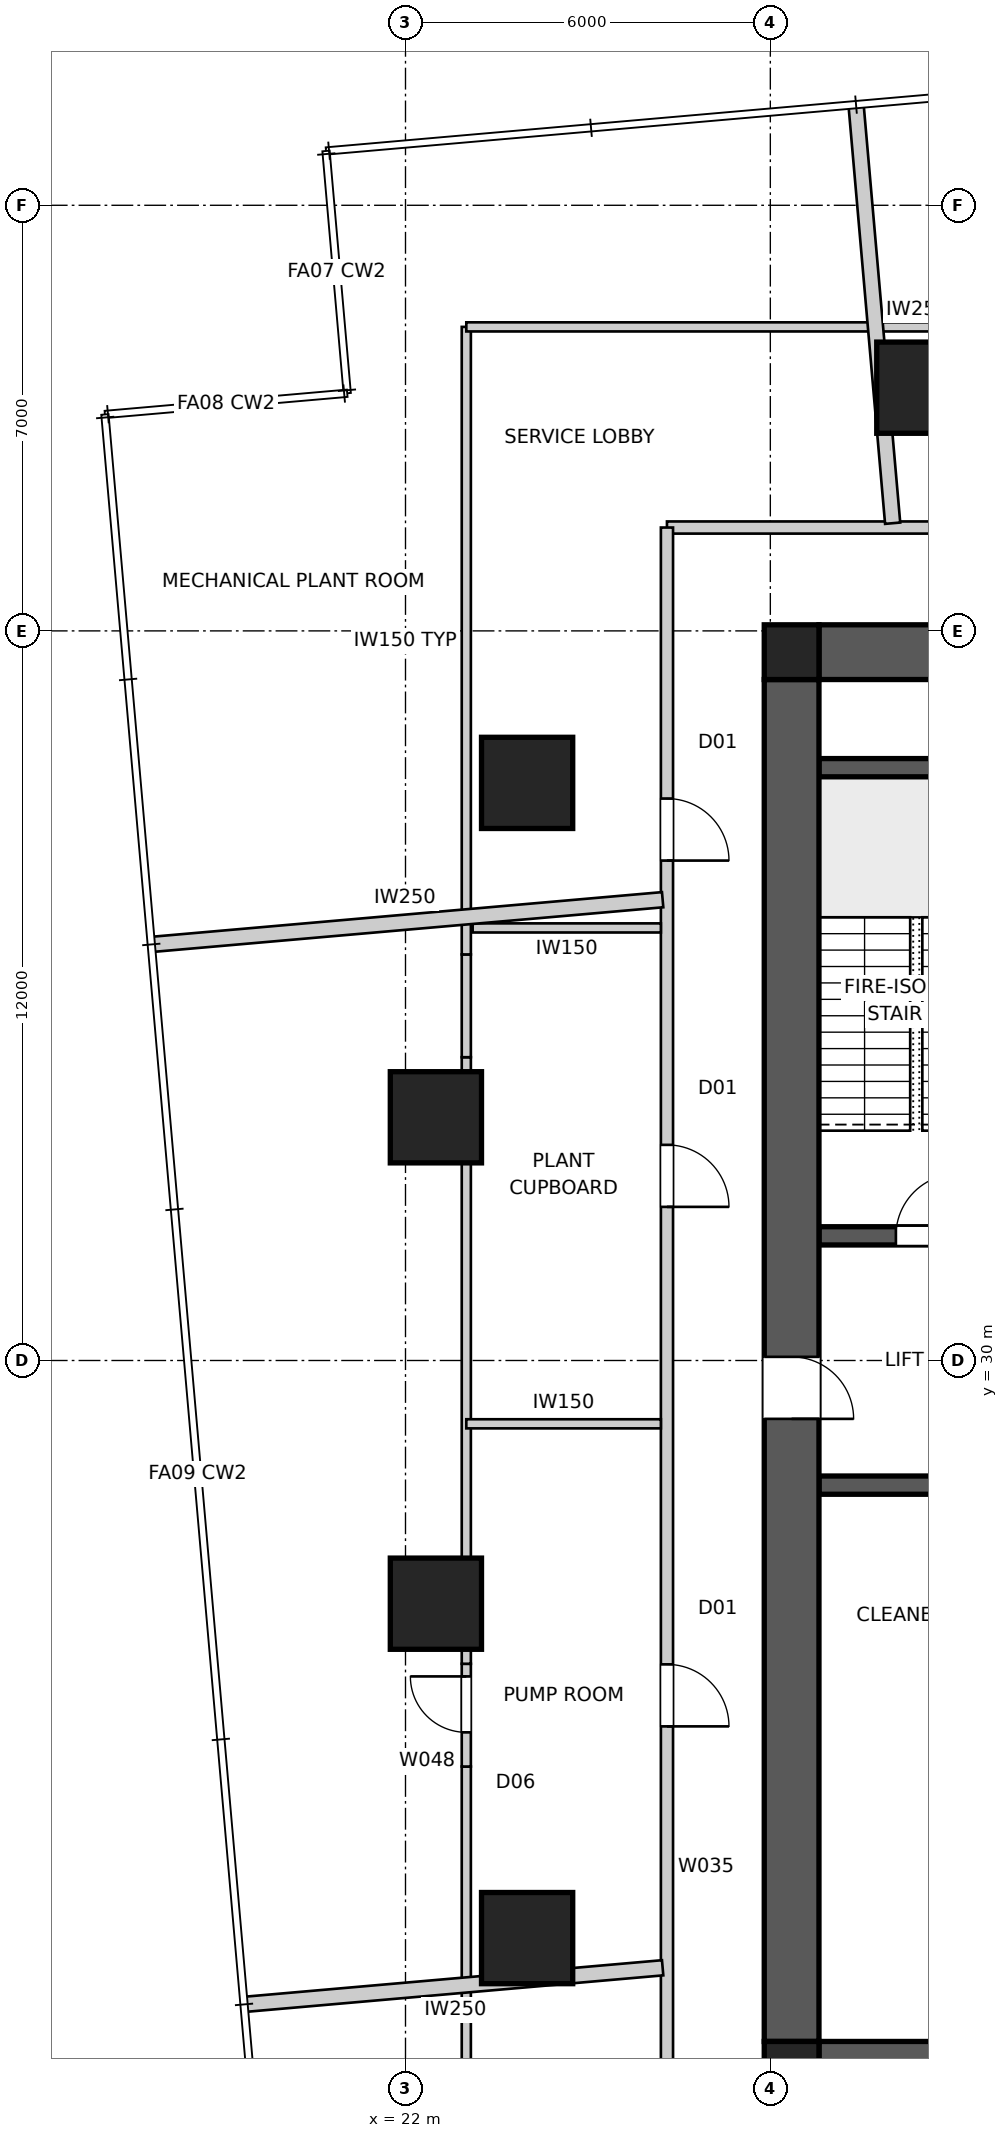
"""IFC4 building model, lengths in metres.
Left out: names, types, materials, properties, quantities, classifications, styles, units other than length and angle.
Written with IfcOpenShell. Run it as: python <this file> out.ifc"""

import sys

from ifc_helpers import new_model, si_unit, direction, frame, frame_2d, origin, origin_2d, place, context, subcontext, project, spatial, polyline, rectangle, outline, extrude, element, fill, save


model = new_model("IFC4")
c1 = context("Model", 3, precision=1e-05, world=origin(), true_north=direction((0.0, 1.0)))
c2 = subcontext(c1, "Body", "Model", "MODEL_VIEW")
j1 = project(units=[si_unit("LENGTHUNIT", "METRE"), si_unit("PLANEANGLEUNIT", "RADIAN")], contexts=[c1])
p1 = place(None, origin())
s1 = spatial("IfcSite", under=j1, at=p1, CompositionType="ELEMENT")
p2 = place(p1, origin())
s2 = spatial("IfcBuilding", under=s1, at=p2, CompositionType="ELEMENT")
p3 = place(p2, frame((0.0, 0.0, 42.2)))
s3 = spatial("IfcBuildingStorey", under=s2, at=p3, CompositionType="ELEMENT", Elevation=42.2)
for number, where, z_axis, x_axis in (
    (1, (28.8, 41.65, 0.0), (0.0, 0.0, 1.0), (1.0, 0.0, 0.0)),
    (2, (51.2, 18.35, 0.0), (0.0, 0.0, 1.0), (-1.0, 0.0, 0.0)),
):
    element("IfcWall", number, at=place(p3, frame(where, z_axis=z_axis, x_axis=x_axis)), inside=s3, PredefinedType="SHEAR", context=c2, shape_type="SweptSolid", body=[
        extrude(outline(polyline([(0.0, -0.45), (22.4, -0.45), (22.4, -0.025), (22.85, -0.025), (22.85, 0.025), (22.4, 0.025), (22.4, 0.45), (0.0, 0.45), (0.0, 0.025), (-0.45, 0.025), (-0.45, -0.025), (0.0, -0.025), (0.0, -0.45)])), origin(), (0.0, 0.0, 1.0), 5.0),
    ])
p4 = place(p3, frame((28.35, 41.2, 0.0), z_axis=(0.0, 0.0, 1.0), x_axis=(0.0, -1.0, 0.0)))
e3 = element("IfcWall", 3, at=p4, inside=s3, PredefinedType="SHEAR", context=c2, shape_type="SweptSolid", body=[
    extrude(outline(polyline([(0.0, -0.45), (22.4, -0.45), (22.4, -0.025), (22.85, -0.025), (22.85, 0.025), (22.4, 0.025), (22.4, 0.45), (0.0, 0.45), (0.0, 0.025), (-0.45, 0.025), (-0.45, -0.025), (0.0, -0.025), (0.0, -0.45)])), origin(), (0.0, 0.0, 1.0), 5.0),
])
p5 = place(p4, frame((11.14, 0.0, 0.0)))
e4 = element("IfcOpeningElement", 4, at=p5, cuts=e3, PredefinedType="OPENING", context=c2, shape_type="SweptSolid", body=[
    extrude(rectangle(XDim=1.02, YDim=2.4, at=frame_2d((0.51, 1.2))), frame((0.0, 0.46, 0.0), z_axis=(0.0, -1.0, 0.0), x_axis=(1.0, 0.0, 0.0)), (0.0, 0.0, 1.0), 0.92),
])
p6 = place(p3, frame((28.8, 32.05, 0.0), z_axis=(0.0, 0.0, 1.0), x_axis=(1.0, 0.0, 0.0)))
e5 = element("IfcWall", 5, at=p6, inside=s3, PredefinedType="SHEAR", context=c2, shape_type="SweptSolid", body=[
    extrude(rectangle(XDim=22.4, YDim=0.3, at=frame_2d((11.2, 0.0))), origin(), (0.0, 0.0, 1.0), 5.0),
])
p7 = place(p6, frame((19.04, 0.0, 0.0)))
e6 = element("IfcOpeningElement", 6, at=p7, cuts=e5, PredefinedType="OPENING", context=c2, shape_type="SweptSolid", body=[
    extrude(rectangle(XDim=0.92, YDim=2.1, at=frame_2d((0.46, 1.05))), frame((0.0, 0.16, 0.0), z_axis=(0.0, -1.0, 0.0), x_axis=(1.0, 0.0, 0.0)), (0.0, 0.0, 1.0), 0.32),
])
p8 = place(p6, frame((1.265, 0.0, 0.0)))
e7 = element("IfcOpeningElement", 7, at=p8, cuts=e5, PredefinedType="OPENING", context=c2, shape_type="SweptSolid", body=[
    extrude(rectangle(XDim=1.02, YDim=2.1, at=frame_2d((0.51, 1.05))), frame((0.0, 0.16, 0.0), z_axis=(0.0, -1.0, 0.0), x_axis=(1.0, 0.0, 0.0)), (0.0, 0.0, 1.0), 0.32),
])
p9 = place(p6, frame((4.015, 0.0, 0.0)))
e8 = element("IfcOpeningElement", 8, at=p9, cuts=e5, PredefinedType="OPENING", context=c2, shape_type="SweptSolid", body=[
    extrude(rectangle(XDim=0.92, YDim=2.1, at=frame_2d((0.46, 1.05))), frame((0.0, 0.16, 0.0), z_axis=(0.0, -1.0, 0.0), x_axis=(1.0, 0.0, 0.0)), (0.0, 0.0, 1.0), 0.32),
])
p10 = place(p6, frame((6.45, 0.0, 0.0)))
e9 = element("IfcOpeningElement", 9, at=p10, cuts=e5, PredefinedType="OPENING", context=c2, shape_type="SweptSolid", body=[
    extrude(rectangle(XDim=1.1, YDim=2.1, at=frame_2d((0.55, 1.05))), frame((0.0, 0.16, 0.0), z_axis=(0.0, -1.0, 0.0), x_axis=(1.0, 0.0, 0.0)), (0.0, 0.0, 1.0), 0.32),
])
p11 = place(p6, frame((9.25, 0.0, 0.0)))
e10 = element("IfcOpeningElement", 10, at=p11, cuts=e5, PredefinedType="OPENING", context=c2, shape_type="SweptSolid", body=[
    extrude(rectangle(XDim=1.1, YDim=2.1, at=frame_2d((0.55, 1.05))), frame((0.0, 0.16, 0.0), z_axis=(0.0, -1.0, 0.0), x_axis=(1.0, 0.0, 0.0)), (0.0, 0.0, 1.0), 0.32),
])
p12 = place(p6, frame((14.85, 0.0, 0.0)))
e11 = element("IfcOpeningElement", 11, at=p12, cuts=e5, PredefinedType="OPENING", context=c2, shape_type="SweptSolid", body=[
    extrude(rectangle(XDim=1.1, YDim=2.1, at=frame_2d((0.55, 1.05))), frame((0.0, 0.16, 0.0), z_axis=(0.0, -1.0, 0.0), x_axis=(1.0, 0.0, 0.0)), (0.0, 0.0, 1.0), 0.32),
])
p13 = place(p3, frame((51.2, 27.95, 0.0), z_axis=(0.0, 0.0, 1.0), x_axis=(-1.0, 0.0, 0.0)))
e12 = element("IfcWall", 12, at=p13, inside=s3, PredefinedType="SHEAR", context=c2, shape_type="SweptSolid", body=[
    extrude(rectangle(XDim=22.4, YDim=0.3, at=frame_2d((11.2, 0.0))), origin(), (0.0, 0.0, 1.0), 5.0),
])
p14 = place(p13, frame((19.04, 0.0, 0.0)))
e13 = element("IfcOpeningElement", 13, at=p14, cuts=e12, PredefinedType="OPENING", context=c2, shape_type="SweptSolid", body=[
    extrude(rectangle(XDim=0.92, YDim=2.1, at=frame_2d((0.46, 1.05))), frame((0.0, 0.16, 0.0), z_axis=(0.0, -1.0, 0.0), x_axis=(1.0, 0.0, 0.0)), (0.0, 0.0, 1.0), 0.32),
])
p15 = place(p13, frame((1.265, 0.0, 0.0)))
e14 = element("IfcOpeningElement", 14, at=p15, cuts=e12, PredefinedType="OPENING", context=c2, shape_type="SweptSolid", body=[
    extrude(rectangle(XDim=1.02, YDim=2.1, at=frame_2d((0.51, 1.05))), frame((0.0, 0.16, 0.0), z_axis=(0.0, -1.0, 0.0), x_axis=(1.0, 0.0, 0.0)), (0.0, 0.0, 1.0), 0.32),
])
p16 = place(p13, frame((4.015, 0.0, 0.0)))
e15 = element("IfcOpeningElement", 15, at=p16, cuts=e12, PredefinedType="OPENING", context=c2, shape_type="SweptSolid", body=[
    extrude(rectangle(XDim=0.92, YDim=2.1, at=frame_2d((0.46, 1.05))), frame((0.0, 0.16, 0.0), z_axis=(0.0, -1.0, 0.0), x_axis=(1.0, 0.0, 0.0)), (0.0, 0.0, 1.0), 0.32),
])
p17 = place(p13, frame((14.85, 0.0, 0.0)))
e16 = element("IfcOpeningElement", 16, at=p17, cuts=e12, PredefinedType="OPENING", context=c2, shape_type="SweptSolid", body=[
    extrude(rectangle(XDim=1.1, YDim=2.1, at=frame_2d((0.55, 1.05))), frame((0.0, 0.16, 0.0), z_axis=(0.0, -1.0, 0.0), x_axis=(1.0, 0.0, 0.0)), (0.0, 0.0, 1.0), 0.32),
])
p18 = place(p3, frame((28.8, 39.75, 0.0), z_axis=(0.0, 0.0, 1.0), x_axis=(1.0, 0.0, 0.0)))
e17 = element("IfcWall", 17, at=p18, inside=s3, PredefinedType="SHEAR", context=c2, shape_type="SweptSolid", body=[
    extrude(rectangle(XDim=3.5, YDim=0.3, at=frame_2d((1.75, 0.0))), origin(), (0.0, 0.0, 1.0), 5.0),
])
for number, where, z_axis, x_axis in (
    (18, (28.35, 18.35, 0.0), (0.0, 0.0, 1.0), (1.0, 0.0, 0.0)),
    (19, (28.35, 41.65, 0.0), (0.0, 0.0, 1.0), (1.0, 0.0, 0.0)),
):
    element("IfcColumn", number, at=place(p3, frame(where, z_axis=z_axis, x_axis=x_axis)), inside=s3, PredefinedType="COLUMN", context=c2, shape_type="SweptSolid", body=[
        extrude(rectangle(XDim=0.9, YDim=0.9, at=origin_2d()), origin(), (0.0, 0.0, 1.0), 5.0),
    ])
for number, where, z_axis, x_axis in (
    (20, (30.5, 46.0, 0.0), (0.0, 0.0, 1.0), (1.0, 0.0, 0.0)),
    (21, (24.0, 39.5, 0.0), (0.0, 0.0, 1.0), (1.0, 0.0, 0.0)),
    (22, (22.5, 34.0, 0.0), (0.0, 0.0, 1.0), (1.0, 0.0, 0.0)),
    (23, (22.5, 26.0, 0.0), (0.0, 0.0, 1.0), (1.0, 0.0, 0.0)),
    (24, (24.0, 20.5, 0.0), (0.0, 0.0, 1.0), (1.0, 0.0, 0.0)),
):
    element("IfcColumn", number, at=place(p3, frame(where, z_axis=z_axis, x_axis=x_axis)), inside=s3, PredefinedType="COLUMN", context=c2, shape_type="SweptSolid", body=[
        extrude(rectangle(XDim=1.5, YDim=1.5, at=origin_2d()), origin(), (0.0, 0.0, 1.0), 5.0),
    ])
p19 = place(p3, frame((53.7, 43.7, 0.0), z_axis=(0.0, 0.0, 1.0), x_axis=(-1.0, 0.0, 0.0)))
e25 = element("IfcWall", 25, at=p19, inside=s3, PredefinedType="PARTITIONING", context=c2, shape_type="SweptSolid", body=[
    extrude(rectangle(XDim=27.4, YDim=0.2, at=frame_2d((13.7, 0.0))), origin(), (0.0, 0.0, 1.0), 4.85),
])
p20 = place(p19, frame((18.698, 0.0, 0.0)))
e26 = element("IfcOpeningElement", 26, at=p20, cuts=e25, PredefinedType="OPENING", context=c2, shape_type="SweptSolid", body=[
    extrude(rectangle(XDim=1.02, YDim=2.34, at=frame_2d((0.51, 1.17))), frame((0.0, 0.11, 0.0), z_axis=(0.0, -1.0, 0.0), x_axis=(1.0, 0.0, 0.0)), (0.0, 0.0, 1.0), 0.22),
])
p21 = place(p19, frame((10.153, 0.0, 0.0)))
e27 = element("IfcOpeningElement", 27, at=p21, cuts=e25, PredefinedType="OPENING", context=c2, shape_type="SweptSolid", body=[
    extrude(rectangle(XDim=1.02, YDim=2.34, at=frame_2d((0.51, 1.17))), frame((0.0, 0.11, 0.0), z_axis=(0.0, -1.0, 0.0), x_axis=(1.0, 0.0, 0.0)), (0.0, 0.0, 1.0), 0.22),
])
p22 = place(p19, frame((4.458, 0.0, 0.0)))
e28 = element("IfcOpeningElement", 28, at=p22, cuts=e25, PredefinedType="OPENING", context=c2, shape_type="SweptSolid", body=[
    extrude(rectangle(XDim=1.02, YDim=2.34, at=frame_2d((0.51, 1.17))), frame((0.0, 0.11, 0.0), z_axis=(0.0, -1.0, 0.0), x_axis=(1.0, 0.0, 0.0)), (0.0, 0.0, 1.0), 0.22),
])
p23 = place(p3, frame((26.3, 43.7, 0.0), z_axis=(0.0, 0.0, 1.0), x_axis=(0.0, -1.0, 0.0)))
e29 = element("IfcWall", 29, at=p23, inside=s3, PredefinedType="PARTITIONING", context=c2, shape_type="SweptSolid", body=[
    extrude(rectangle(XDim=27.4, YDim=0.2, at=frame_2d((13.7, 0.0))), origin(), (0.0, 0.0, 1.0), 4.85),
])
p24 = place(p23, frame((18.698, 0.0, 0.0)))
e30 = element("IfcOpeningElement", 30, at=p24, cuts=e29, PredefinedType="OPENING", context=c2, shape_type="SweptSolid", body=[
    extrude(rectangle(XDim=1.02, YDim=2.34, at=frame_2d((0.51, 1.17))), frame((0.0, 0.11, 0.0), z_axis=(0.0, -1.0, 0.0), x_axis=(1.0, 0.0, 0.0)), (0.0, 0.0, 1.0), 0.22),
])
p25 = place(p23, frame((10.153, 0.0, 0.0)))
e31 = element("IfcOpeningElement", 31, at=p25, cuts=e29, PredefinedType="OPENING", context=c2, shape_type="SweptSolid", body=[
    extrude(rectangle(XDim=1.02, YDim=2.34, at=frame_2d((0.51, 1.17))), frame((0.0, 0.11, 0.0), z_axis=(0.0, -1.0, 0.0), x_axis=(1.0, 0.0, 0.0)), (0.0, 0.0, 1.0), 0.22),
])
p26 = place(p23, frame((4.458, 0.0, 0.0)))
e32 = element("IfcOpeningElement", 32, at=p26, cuts=e29, PredefinedType="OPENING", context=c2, shape_type="SweptSolid", body=[
    extrude(rectangle(XDim=1.02, YDim=2.34, at=frame_2d((0.51, 1.17))), frame((0.0, 0.11, 0.0), z_axis=(0.0, -1.0, 0.0), x_axis=(1.0, 0.0, 0.0)), (0.0, 0.0, 1.0), 0.22),
])
p27 = place(p3, frame((29.409, 50.656, 0.0), z_axis=(0.0, 0.0, 1.0), x_axis=(0.087152488477, -0.996194982798, 0.0)))
e33 = element("IfcWall", 33, at=p27, inside=s3, PredefinedType="PARTITIONING", context=c2, shape_type="SweptSolid", body=[
    extrude(rectangle(XDim=6.911, YDim=0.25, at=frame_2d((3.456, 0.0))), origin(), (0.0, 0.0, 1.0), 4.85),
])
p28 = place(p3, frame((17.819, 36.843, 0.0), z_axis=(0.0, 0.0, 1.0), x_axis=(0.996194000005, 0.087163721544, 0.0)))
e34 = element("IfcWall", 34, at=p28, inside=s3, PredefinedType="PARTITIONING", context=c2, shape_type="SweptSolid", body=[
    extrude(rectangle(XDim=8.442, YDim=0.25, at=frame_2d((4.221, 0.0))), origin(), (0.0, 0.0, 1.0), 4.85),
])
p29 = place(p3, frame((19.344, 19.409, 0.0), z_axis=(0.0, 0.0, 1.0), x_axis=(0.996194982798, 0.087152488477, 0.0)))
e35 = element("IfcWall", 35, at=p29, inside=s3, PredefinedType="PARTITIONING", context=c2, shape_type="SweptSolid", body=[
    extrude(rectangle(XDim=6.911, YDim=0.25, at=frame_2d((3.456, 0.0))), origin(), (0.0, 0.0, 1.0), 4.85),
])
p30 = place(p3, frame((23.0, 13.0, 0.0), z_axis=(0.0, 0.0, 1.0), x_axis=(0.0, 1.0, 0.0)))
e36 = element("IfcWall", 36, at=p30, inside=s3, PredefinedType="SOLIDWALL", context=c2, shape_type="SweptSolid", body=[
    extrude(rectangle(XDim=10.322, YDim=0.15, at=frame_2d((5.161, 0.0))), origin(), (0.0, 0.0, 1.0), 4.85),
])
p31 = place(p3, frame((23.0, 23.322, 0.0), z_axis=(0.0, 0.0, 1.0), x_axis=(0.0, 1.0, 0.0)))
e37 = element("IfcWall", 37, at=p31, inside=s3, PredefinedType="SOLIDWALL", context=c2, shape_type="SweptSolid", body=[
    extrude(rectangle(XDim=1.69, YDim=0.15, at=frame_2d((0.845, 0.0))), origin(), (0.0, 0.0, 1.0), 3.85),
])
p32 = place(p31, frame((0.562, 0.0, 0.0)))
e38 = element("IfcOpeningElement", 38, at=p32, cuts=e37, PredefinedType="OPENING", context=c2, shape_type="SweptSolid", body=[
    extrude(rectangle(XDim=0.92, YDim=2.1, at=frame_2d((0.46, 1.05))), frame((0.0, 0.085, 0.0), z_axis=(0.0, -1.0, 0.0), x_axis=(1.0, 0.0, 0.0)), (0.0, 0.0, 1.0), 0.17),
])
p33 = place(p3, frame((23.0, 25.012, 0.0), z_axis=(0.0, 0.0, 1.0), x_axis=(0.0, 1.0, 0.0)))
e39 = element("IfcWall", 39, at=p33, inside=s3, PredefinedType="SOLIDWALL", context=c2, shape_type="SweptSolid", body=[
    extrude(rectangle(XDim=9.977, YDim=0.15, at=frame_2d((4.988, 0.0))), origin(), (0.0, 0.0, 1.0), 4.85),
])
p34 = place(p3, frame((23.0, 34.988, 0.0), z_axis=(0.0, 0.0, 1.0), x_axis=(0.0, 1.0, 0.0)))
e40 = element("IfcWall", 40, at=p34, inside=s3, PredefinedType="SOLIDWALL", context=c2, shape_type="SweptSolid", body=[
    extrude(rectangle(XDim=1.69, YDim=0.15, at=frame_2d((0.845, 0.0))), origin(), (0.0, 0.0, 1.0), 3.85),
])
for number, where, z_axis, x_axis in (
    (41, (23.0, 36.678, 0.0), (0.0, 0.0, 1.0), (0.0, 1.0, 0.0)),
    (42, (23.0, 47.0, 0.0), (0.0, 0.0, 1.0), (1.0, 0.0, 0.0)),
):
    element("IfcWall", number, at=place(p3, frame(where, z_axis=z_axis, x_axis=x_axis)), inside=s3, PredefinedType="SOLIDWALL", context=c2, shape_type="SweptSolid", body=[
        extrude(rectangle(XDim=10.322, YDim=0.15, at=frame_2d((5.161, 0.0))), origin(), (0.0, 0.0, 1.0), 4.85),
    ])
p35 = place(p3, frame((26.2, 37.115, 0.0), z_axis=(0.0, 0.0, 1.0), x_axis=(-1.0, 0.0, 0.0)))
e43 = element("IfcWall", 43, at=p35, inside=s3, PredefinedType="SOLIDWALL", context=c2, shape_type="SweptSolid", body=[
    extrude(rectangle(XDim=3.096, YDim=0.15, at=frame_2d((1.548, 0.0))), origin(), (0.0, 0.0, 1.0), 4.85),
])
p36 = place(p3, frame((23.0, 28.959, 0.0), z_axis=(0.0, 0.0, 1.0), x_axis=(1.0, 0.0, 0.0)))
e44 = element("IfcWall", 44, at=p36, inside=s3, PredefinedType="SOLIDWALL", context=c2, shape_type="SweptSolid", body=[
    extrude(rectangle(XDim=3.2, YDim=0.15, at=frame_2d((1.6, 0.0))), origin(), (0.0, 0.0, 1.0), 4.85),
])
p37 = place(p8, origin())
e45 = element("IfcDoor", 45, at=p37, inside=s3, OperationType="SINGLE_SWING_RIGHT", PredefinedType="DOOR", context=c2, shape_type="SweptSolid", body=[
    extrude(rectangle(XDim=1.02, YDim=2.1, at=frame_2d((0.51, 1.05))), frame((0.0, 0.025, 0.0), z_axis=(0.0, -1.0, 0.0), x_axis=(1.0, 0.0, 0.0)), (0.0, 0.0, 1.0), 0.05),
])
fill(e7, e45)
p38 = place(p24, origin())
e46 = element("IfcDoor", 46, at=p38, inside=s3, OperationType="SINGLE_SWING_RIGHT", PredefinedType="DOOR", context=c2, shape_type="SweptSolid", body=[
    extrude(rectangle(XDim=1.02, YDim=2.34, at=frame_2d((0.51, 1.17))), frame((0.0, 0.025, 0.0), z_axis=(0.0, -1.0, 0.0), x_axis=(1.0, 0.0, 0.0)), (0.0, 0.0, 1.0), 0.05),
])
fill(e30, e46)
p39 = place(p25, origin())
e47 = element("IfcDoor", 47, at=p39, inside=s3, OperationType="SINGLE_SWING_RIGHT", PredefinedType="DOOR", context=c2, shape_type="SweptSolid", body=[
    extrude(rectangle(XDim=1.02, YDim=2.34, at=frame_2d((0.51, 1.17))), frame((0.0, 0.025, 0.0), z_axis=(0.0, -1.0, 0.0), x_axis=(1.0, 0.0, 0.0)), (0.0, 0.0, 1.0), 0.05),
])
fill(e31, e47)
p40 = place(p26, origin())
e48 = element("IfcDoor", 48, at=p40, inside=s3, OperationType="SINGLE_SWING_RIGHT", PredefinedType="DOOR", context=c2, shape_type="SweptSolid", body=[
    extrude(rectangle(XDim=1.02, YDim=2.34, at=frame_2d((0.51, 1.17))), frame((0.0, 0.025, 0.0), z_axis=(0.0, -1.0, 0.0), x_axis=(1.0, 0.0, 0.0)), (0.0, 0.0, 1.0), 0.05),
])
fill(e32, e48)
p41 = place(p32, origin())
e49 = element("IfcDoor", 49, at=p41, inside=s3, OperationType="SINGLE_SWING_RIGHT", PredefinedType="DOOR", context=c2, shape_type="SweptSolid", body=[
    extrude(rectangle(XDim=0.92, YDim=2.1, at=frame_2d((0.46, 1.05))), frame((0.0, 0.025, 0.0), z_axis=(0.0, -1.0, 0.0), x_axis=(1.0, 0.0, 0.0)), (0.0, 0.0, 1.0), 0.05),
])
fill(e38, e49)
p42 = place(p5, origin())
e50 = element("IfcDoor", 50, at=p42, inside=s3, OperationType="SINGLE_SWING_RIGHT", PredefinedType="DOOR", context=c2, shape_type="SweptSolid", body=[
    extrude(rectangle(XDim=1.02, YDim=2.4, at=frame_2d((0.51, 1.2))), frame((0.0, 0.025, 0.0), z_axis=(0.0, -1.0, 0.0), x_axis=(1.0, 0.0, 0.0)), (0.0, 0.0, 1.0), 0.05),
])
fill(e4, e50)
save(model, sys.argv[1])
